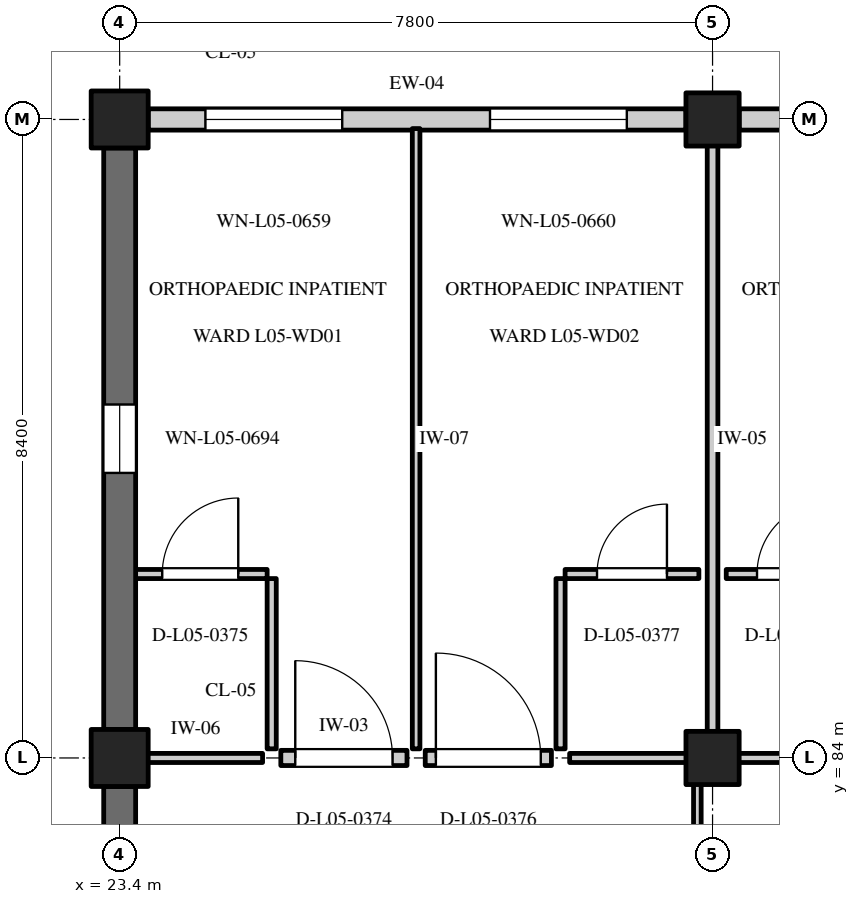
"""IFC4 building model, lengths in metres.
Left out: names, types, materials, properties, quantities, classifications, styles, units other than length and angle.
Written with IfcOpenShell. Run it as: python <this file> out.ifc"""

import sys

from ifc_helpers import new_model, si_unit, direction, frame, frame_2d, origin, origin_2d, place, context, subcontext, project, spatial, rectangle, extrude, element, fill, save


model = new_model("IFC4")
c1 = context("Model", 3, precision=1e-05, world=origin(), true_north=direction((0.0, 1.0)))
c2 = subcontext(c1, "Body", "Model", "MODEL_VIEW")
j1 = project(units=[si_unit("LENGTHUNIT", "METRE"), si_unit("PLANEANGLEUNIT", "RADIAN")], contexts=[c1])
p1 = place(None, origin())
s1 = spatial("IfcSite", under=j1, at=p1, CompositionType="ELEMENT")
p2 = place(p1, origin())
s2 = spatial("IfcBuilding", under=s1, at=p2, CompositionType="ELEMENT")
p3 = place(p2, frame((0.0, 0.0, 22.2)))
s3 = spatial("IfcBuildingStorey", under=s2, at=p3, CompositionType="ELEMENT", Elevation=22.2)
for number, where, z_axis, x_axis in (
    (1, (23.4, 84.0, 0.0), (0.0, 0.0, 1.0), (1.0, 0.0, 0.0)),
    (2, (23.4, 92.4, 0.0), (0.0, 0.0, 1.0), (1.0, 0.0, 0.0)),
):
    element("IfcColumn", number, at=place(p3, frame(where, z_axis=z_axis, x_axis=x_axis)), inside=s3, PredefinedType="COLUMN", context=c2, shape_type="SweptSolid", body=[
        extrude(rectangle(XDim=0.75, YDim=0.75, at=origin_2d()), origin(), (0.0, 0.0, 1.0), 3.9),
    ])
for number, where, z_axis, x_axis in (
    (3, (31.2, 84.0, 0.0), (0.0, 0.0, 1.0), (1.0, 0.0, 0.0)),
    (4, (31.2, 92.4, 0.0), (0.0, 0.0, 1.0), (1.0, 0.0, 0.0)),
):
    element("IfcColumn", number, at=place(p3, frame(where, z_axis=z_axis, x_axis=x_axis)), inside=s3, PredefinedType="COLUMN", context=c2, shape_type="SweptSolid", body=[
        extrude(rectangle(XDim=0.7, YDim=0.7, at=origin_2d()), origin(), (0.0, 0.0, 1.0), 3.9),
    ])
p4 = place(p3, frame((23.775, 92.4, 0.0), z_axis=(0.0, 0.0, 1.0), x_axis=(1.0, 0.0, 0.0)))
e5 = element("IfcWall", 5, at=p4, inside=s3, PredefinedType="STANDARD", context=c2, shape_type="SweptSolid", body=[
    extrude(rectangle(XDim=7.075, YDim=0.28, at=frame_2d((3.538, 0.0))), origin(), (0.0, 0.0, 1.0), 3.05),
])
p5 = place(p4, frame((0.753, 0.0, 0.8)))
e6 = element("IfcOpeningElement", 6, at=p5, cuts=e5, PredefinedType="OPENING", context=c2, shape_type="SweptSolid", body=[
    extrude(rectangle(XDim=1.8, YDim=1.75, at=frame_2d((0.9, 0.875))), frame((0.0, 0.152, 0.0), z_axis=(0.0, -1.0, 0.0), x_axis=(1.0, 0.0, 0.0)), (0.0, 0.0, 1.0), 0.304),
])
p6 = place(p4, frame((4.497, 0.0, 0.8)))
e7 = element("IfcOpeningElement", 7, at=p6, cuts=e5, PredefinedType="OPENING", context=c2, shape_type="SweptSolid", body=[
    extrude(rectangle(XDim=1.8, YDim=1.75, at=frame_2d((0.9, 0.875))), frame((0.0, 0.152, 0.0), z_axis=(0.0, -1.0, 0.0), x_axis=(1.0, 0.0, 0.0)), (0.0, 0.0, 1.0), 0.304),
])
p7 = place(p3, frame((31.55, 92.4, 0.0), z_axis=(0.0, 0.0, 1.0), x_axis=(1.0, 0.0, 0.0)))
e8 = element("IfcWall", 8, at=p7, inside=s3, PredefinedType="STANDARD", context=c2, shape_type="SweptSolid", body=[
    extrude(rectangle(XDim=7.1, YDim=0.28, at=frame_2d((3.55, 0.0))), origin(), (0.0, 0.0, 1.0), 3.05),
])
p8 = place(p7, frame((0.778, 0.0, 0.8)))
e9 = element("IfcOpeningElement", 9, at=p8, cuts=e8, PredefinedType="OPENING", context=c2, shape_type="SweptSolid", body=[
    extrude(rectangle(XDim=1.8, YDim=1.65, at=frame_2d((0.9, 0.825))), frame((0.0, 0.152, 0.0), z_axis=(0.0, -1.0, 0.0), x_axis=(1.0, 0.0, 0.0)), (0.0, 0.0, 1.0), 0.304),
])
p9 = place(p7, frame((4.522, 0.0, 0.8)))
e10 = element("IfcOpeningElement", 10, at=p9, cuts=e8, PredefinedType="OPENING", context=c2, shape_type="SweptSolid", body=[
    extrude(rectangle(XDim=1.8, YDim=1.65, at=frame_2d((0.9, 0.825))), frame((0.0, 0.152, 0.0), z_axis=(0.0, -1.0, 0.0), x_axis=(1.0, 0.0, 0.0)), (0.0, 0.0, 1.0), 0.304),
])
p10 = place(p3, frame((23.4, 75.975, 0.0), z_axis=(0.0, 0.0, 1.0), x_axis=(0.0, 1.0, 0.0)))
e11 = element("IfcWall", 11, at=p10, inside=s3, PredefinedType="SOLIDWALL", context=c2, shape_type="SweptSolid", body=[
    extrude(rectangle(XDim=7.65, YDim=0.42, at=frame_2d((3.825, 0.0))), origin(), (0.0, 0.0, 1.0), 2.95),
])
p11 = place(p10, frame((3.325, 0.0, 0.8)))
e12 = element("IfcOpeningElement", 12, at=p11, cuts=e11, PredefinedType="OPENING", context=c2, shape_type="SweptSolid", body=[
    extrude(rectangle(XDim=1.0, YDim=1.45, at=frame_2d((0.5, 0.725))), frame((0.0, 0.222, 0.0), z_axis=(0.0, -1.0, 0.0), x_axis=(1.0, 0.0, 0.0)), (0.0, 0.0, 1.0), 0.444),
])
p12 = place(p3, frame((23.4, 84.375, 0.0), z_axis=(0.0, 0.0, 1.0), x_axis=(0.0, 1.0, 0.0)))
e13 = element("IfcWall", 13, at=p12, inside=s3, PredefinedType="SOLIDWALL", context=c2, shape_type="SweptSolid", body=[
    extrude(rectangle(XDim=7.65, YDim=0.42, at=frame_2d((3.825, 0.0))), origin(), (0.0, 0.0, 1.0), 2.95),
])
p13 = place(p12, frame((3.375, 0.0, 0.8)))
e14 = element("IfcOpeningElement", 14, at=p13, cuts=e13, PredefinedType="OPENING", context=c2, shape_type="SweptSolid", body=[
    extrude(rectangle(XDim=0.9, YDim=1.3, at=frame_2d((0.45, 0.65))), frame((0.0, 0.222, 0.0), z_axis=(0.0, -1.0, 0.0), x_axis=(1.0, 0.0, 0.0)), (0.0, 0.0, 1.0), 0.444),
])
p14 = place(p3, frame((27.3, 84.12, 0.0), z_axis=(0.0, 0.0, 1.0), x_axis=(0.0, 1.0, 0.0)))
e15 = element("IfcWall", 15, at=p14, inside=s3, PredefinedType="PARTITIONING", context=c2, shape_type="SweptSolid", body=[
    extrude(rectangle(XDim=8.16, YDim=0.1, at=frame_2d((4.08, 0.0))), origin(), (0.0, 0.0, 1.0), 3.58),
])
p15 = place(p3, frame((25.52, 84.0, 0.0), z_axis=(0.0, 0.0, 1.0), x_axis=(1.0, 0.0, 0.0)))
e16 = element("IfcWall", 16, at=p15, inside=s3, PredefinedType="STANDARD", context=c2, shape_type="SweptSolid", body=[
    extrude(rectangle(XDim=1.66, YDim=0.2, at=frame_2d((0.83, 0.0))), origin(), (0.0, 0.0, 1.0), 2.95),
])
p16 = place(p15, frame((0.19, 0.0, 0.0)))
e17 = element("IfcOpeningElement", 17, at=p16, cuts=e16, PredefinedType="OPENING", context=c2, shape_type="SweptSolid", body=[
    extrude(rectangle(XDim=1.28, YDim=2.15, at=frame_2d((0.64, 1.075))), frame((0.0, 0.112, 0.0), z_axis=(0.0, -1.0, 0.0), x_axis=(1.0, 0.0, 0.0)), (0.0, 0.0, 1.0), 0.224),
])
p17 = place(p3, frame((23.52, 84.0, 0.0), z_axis=(0.0, 0.0, 1.0), x_axis=(1.0, 0.0, 0.0)))
e18 = element("IfcWall", 18, at=p17, inside=s3, PredefinedType="PARTITIONING", context=c2, shape_type="SweptSolid", body=[
    extrude(rectangle(XDim=1.76, YDim=0.12, at=frame_2d((0.88, 0.0))), origin(), (0.0, 0.0, 1.0), 2.95),
])
p18 = place(p3, frame((25.4, 84.12, 0.0), z_axis=(0.0, 0.0, 1.0), x_axis=(0.0, 1.0, 0.0)))
e19 = element("IfcWall", 19, at=p18, inside=s3, PredefinedType="PARTITIONING", context=c2, shape_type="SweptSolid", body=[
    extrude(rectangle(XDim=2.24, YDim=0.12, at=frame_2d((1.12, 0.0))), origin(), (0.0, 0.0, 1.0), 3.58),
])
p19 = place(p3, frame((23.58, 86.42, 0.0), z_axis=(0.0, 0.0, 1.0), x_axis=(1.0, 0.0, 0.0)))
e20 = element("IfcWall", 20, at=p19, inside=s3, PredefinedType="PARTITIONING", context=c2, shape_type="SweptSolid", body=[
    extrude(rectangle(XDim=1.76, YDim=0.12, at=frame_2d((0.88, 0.0))), origin(), (0.0, 0.0, 1.0), 3.58),
])
p20 = place(p19, frame((0.38, 0.0, 0.0)))
e21 = element("IfcOpeningElement", 21, at=p20, cuts=e20, PredefinedType="OPENING", context=c2, shape_type="SweptSolid", body=[
    extrude(rectangle(XDim=1.0, YDim=2.1, at=frame_2d((0.5, 1.05))), frame((0.0, 0.072, 0.0), z_axis=(0.0, -1.0, 0.0), x_axis=(1.0, 0.0, 0.0)), (0.0, 0.0, 1.0), 0.144),
])
p21 = place(p3, frame((31.2, 84.12, 0.0), z_axis=(0.0, 0.0, 1.0), x_axis=(0.0, 1.0, 0.0)))
e22 = element("IfcWall", 22, at=p21, inside=s3, PredefinedType="PARTITIONING", context=c2, shape_type="SweptSolid", body=[
    extrude(rectangle(XDim=8.16, YDim=0.14, at=frame_2d((4.08, 0.0))), origin(), (0.0, 0.0, 1.0), 3.58),
])
p22 = place(p3, frame((27.42, 84.0, 0.0), z_axis=(0.0, 0.0, 1.0), x_axis=(1.0, 0.0, 0.0)))
e23 = element("IfcWall", 23, at=p22, inside=s3, PredefinedType="STANDARD", context=c2, shape_type="SweptSolid", body=[
    extrude(rectangle(XDim=1.66, YDim=0.2, at=frame_2d((0.83, 0.0))), origin(), (0.0, 0.0, 1.0), 2.95),
])
p23 = place(p22, frame((0.14, 0.0, 0.0)))
e24 = element("IfcOpeningElement", 24, at=p23, cuts=e23, PredefinedType="OPENING", context=c2, shape_type="SweptSolid", body=[
    extrude(rectangle(XDim=1.38, YDim=2.2, at=frame_2d((0.69, 1.1))), frame((0.0, 0.112, 0.0), z_axis=(0.0, -1.0, 0.0), x_axis=(1.0, 0.0, 0.0)), (0.0, 0.0, 1.0), 0.224),
])
p24 = place(p3, frame((29.32, 84.0, 0.0), z_axis=(0.0, 0.0, 1.0), x_axis=(1.0, 0.0, 0.0)))
e25 = element("IfcWall", 25, at=p24, inside=s3, PredefinedType="PARTITIONING", context=c2, shape_type="SweptSolid", body=[
    extrude(rectangle(XDim=1.76, YDim=0.12, at=frame_2d((0.88, 0.0))), origin(), (0.0, 0.0, 1.0), 2.95),
])
p25 = place(p3, frame((29.2, 84.12, 0.0), z_axis=(0.0, 0.0, 1.0), x_axis=(0.0, 1.0, 0.0)))
e26 = element("IfcWall", 26, at=p25, inside=s3, PredefinedType="PARTITIONING", context=c2, shape_type="SweptSolid", body=[
    extrude(rectangle(XDim=2.24, YDim=0.12, at=frame_2d((1.12, 0.0))), origin(), (0.0, 0.0, 1.0), 3.58),
])
p26 = place(p3, frame((29.26, 86.42, 0.0), z_axis=(0.0, 0.0, 1.0), x_axis=(1.0, 0.0, 0.0)))
e27 = element("IfcWall", 27, at=p26, inside=s3, PredefinedType="PARTITIONING", context=c2, shape_type="SweptSolid", body=[
    extrude(rectangle(XDim=1.76, YDim=0.12, at=frame_2d((0.88, 0.0))), origin(), (0.0, 0.0, 1.0), 3.58),
])
p27 = place(p26, frame((0.42, 0.0, 0.0)))
e28 = element("IfcOpeningElement", 28, at=p27, cuts=e27, PredefinedType="OPENING", context=c2, shape_type="SweptSolid", body=[
    extrude(rectangle(XDim=0.92, YDim=2.08, at=frame_2d((0.46, 1.04))), frame((0.0, 0.072, 0.0), z_axis=(0.0, -1.0, 0.0), x_axis=(1.0, 0.0, 0.0)), (0.0, 0.0, 1.0), 0.144),
])
p28 = place(p3, frame((31.32, 84.0, 0.0), z_axis=(0.0, 0.0, 1.0), x_axis=(1.0, 0.0, 0.0)))
e29 = element("IfcWall", 29, at=p28, inside=s3, PredefinedType="PARTITIONING", context=c2, shape_type="SweptSolid", body=[
    extrude(rectangle(XDim=1.76, YDim=0.12, at=frame_2d((0.88, 0.0))), origin(), (0.0, 0.0, 1.0), 2.95),
])
p29 = place(p3, frame((31.38, 86.42, 0.0), z_axis=(0.0, 0.0, 1.0), x_axis=(1.0, 0.0, 0.0)))
e30 = element("IfcWall", 30, at=p29, inside=s3, PredefinedType="PARTITIONING", context=c2, shape_type="SweptSolid", body=[
    extrude(rectangle(XDim=1.76, YDim=0.12, at=frame_2d((0.88, 0.0))), origin(), (0.0, 0.0, 1.0), 3.58),
])
p30 = place(p29, frame((0.405, 0.0, 0.0)))
e31 = element("IfcOpeningElement", 31, at=p30, cuts=e30, PredefinedType="OPENING", context=c2, shape_type="SweptSolid", body=[
    extrude(rectangle(XDim=0.95, YDim=2.1, at=frame_2d((0.475, 1.05))), frame((0.0, 0.072, 0.0), z_axis=(0.0, -1.0, 0.0), x_axis=(1.0, 0.0, 0.0)), (0.0, 0.0, 1.0), 0.144),
])
p31 = place(p3, frame((31.0, 75.885, 0.0), z_axis=(0.0, 0.0, 1.0), x_axis=(0.0, 1.0, 0.0)))
e32 = element("IfcWall", 32, at=p31, inside=s3, PredefinedType="PARTITIONING", context=c2, shape_type="SweptSolid", body=[
    extrude(rectangle(XDim=8.18, YDim=0.1, at=frame_2d((4.09, 0.0))), origin(), (0.0, 0.0, 1.0), 3.58),
])
p32 = place(p31, frame((2.296, 0.0, 0.0)))
e33 = element("IfcOpeningElement", 33, at=p32, cuts=e32, PredefinedType="OPENING", context=c2, shape_type="SweptSolid", body=[
    extrude(rectangle(XDim=1.2, YDim=2.15, at=frame_2d((0.6, 1.075))), frame((0.0, 0.062, 0.0), z_axis=(0.0, -1.0, 0.0), x_axis=(1.0, 0.0, 0.0)), (0.0, 0.0, 1.0), 0.124),
])
p33 = place(p3, frame((23.4, 83.665, 0.0), z_axis=(0.0, 0.0, 1.0), x_axis=(0.0, 1.0, 0.0)))
e34 = element("IfcWall", 34, at=p33, inside=s3, PredefinedType="PARTITIONING", context=c2, shape_type="SweptSolid", body=[
    extrude(rectangle(XDim=0.4, YDim=0.1, at=frame_2d((0.2, 0.0))), origin(), (0.0, 0.0, 1.0), 2.95),
])
p34 = place(p5, origin())
e35 = element("IfcWindow", 35, at=p34, inside=s3, PartitioningType="DOUBLE_PANEL_VERTICAL", PredefinedType="WINDOW", context=c2, shape_type="SweptSolid", body=[
    extrude(rectangle(XDim=1.8, YDim=1.75, at=frame_2d((0.9, 0.875))), frame((0.0, 0.03, 0.0), z_axis=(0.0, -1.0, 0.0), x_axis=(1.0, 0.0, 0.0)), (0.0, 0.0, 1.0), 0.06),
])
fill(e6, e35)
p35 = place(p6, origin())
e36 = element("IfcWindow", 36, at=p35, inside=s3, PartitioningType="DOUBLE_PANEL_VERTICAL", PredefinedType="WINDOW", context=c2, shape_type="SweptSolid", body=[
    extrude(rectangle(XDim=1.8, YDim=1.75, at=frame_2d((0.9, 0.875))), frame((0.0, 0.03, 0.0), z_axis=(0.0, -1.0, 0.0), x_axis=(1.0, 0.0, 0.0)), (0.0, 0.0, 1.0), 0.06),
])
fill(e7, e36)
p36 = place(p13, origin())
e37 = element("IfcWindow", 37, at=p36, inside=s3, PartitioningType="SINGLE_PANEL", PredefinedType="WINDOW", context=c2, shape_type="SweptSolid", body=[
    extrude(rectangle(XDim=0.9, YDim=1.3, at=frame_2d((0.45, 0.65))), frame((0.0, 0.03, 0.0), z_axis=(0.0, -1.0, 0.0), x_axis=(1.0, 0.0, 0.0)), (0.0, 0.0, 1.0), 0.06),
])
fill(e14, e37)
p37 = place(p16, origin())
e38 = element("IfcDoor", 38, at=p37, inside=s3, OperationType="SINGLE_SWING_LEFT", PredefinedType="DOOR", context=c2, shape_type="SweptSolid", body=[
    extrude(rectangle(XDim=1.28, YDim=2.15, at=frame_2d((0.64, 1.075))), frame((0.0, 0.025, 0.0), z_axis=(0.0, -1.0, 0.0), x_axis=(1.0, 0.0, 0.0)), (0.0, 0.0, 1.0), 0.05),
])
fill(e17, e38)
p38 = place(p20, frame((1.0, 0.0, 0.0), z_axis=(0.0, 0.0, 1.0), x_axis=(-1.0, 0.0, 0.0)))
e39 = element("IfcDoor", 39, at=p38, inside=s3, OperationType="SINGLE_SWING_LEFT", PredefinedType="DOOR", context=c2, shape_type="SweptSolid", body=[
    extrude(rectangle(XDim=1.0, YDim=2.1, at=frame_2d((0.5, 1.05))), frame((0.0, 0.025, 0.0), z_axis=(0.0, -1.0, 0.0), x_axis=(1.0, 0.0, 0.0)), (0.0, 0.0, 1.0), 0.05),
])
fill(e21, e39)
p39 = place(p23, origin())
e40 = element("IfcDoor", 40, at=p39, inside=s3, OperationType="SINGLE_SWING_LEFT", PredefinedType="DOOR", context=c2, shape_type="SweptSolid", body=[
    extrude(rectangle(XDim=1.38, YDim=2.2, at=frame_2d((0.69, 1.1))), frame((0.0, 0.025, 0.0), z_axis=(0.0, -1.0, 0.0), x_axis=(1.0, 0.0, 0.0)), (0.0, 0.0, 1.0), 0.05),
])
fill(e24, e40)
p40 = place(p27, frame((0.92, 0.0, 0.0), z_axis=(0.0, 0.0, 1.0), x_axis=(-1.0, 0.0, 0.0)))
e41 = element("IfcDoor", 41, at=p40, inside=s3, OperationType="SINGLE_SWING_LEFT", PredefinedType="DOOR", context=c2, shape_type="SweptSolid", body=[
    extrude(rectangle(XDim=0.92, YDim=2.08, at=frame_2d((0.46, 1.04))), frame((0.0, 0.025, 0.0), z_axis=(0.0, -1.0, 0.0), x_axis=(1.0, 0.0, 0.0)), (0.0, 0.0, 1.0), 0.05),
])
fill(e28, e41)
p41 = place(p30, frame((0.95, 0.0, 0.0), z_axis=(0.0, 0.0, 1.0), x_axis=(-1.0, 0.0, 0.0)))
e42 = element("IfcDoor", 42, at=p41, inside=s3, OperationType="SINGLE_SWING_LEFT", PredefinedType="DOOR", context=c2, shape_type="SweptSolid", body=[
    extrude(rectangle(XDim=0.95, YDim=2.1, at=frame_2d((0.475, 1.05))), frame((0.0, 0.025, 0.0), z_axis=(0.0, -1.0, 0.0), x_axis=(1.0, 0.0, 0.0)), (0.0, 0.0, 1.0), 0.05),
])
fill(e31, e42)
save(model, sys.argv[1])
